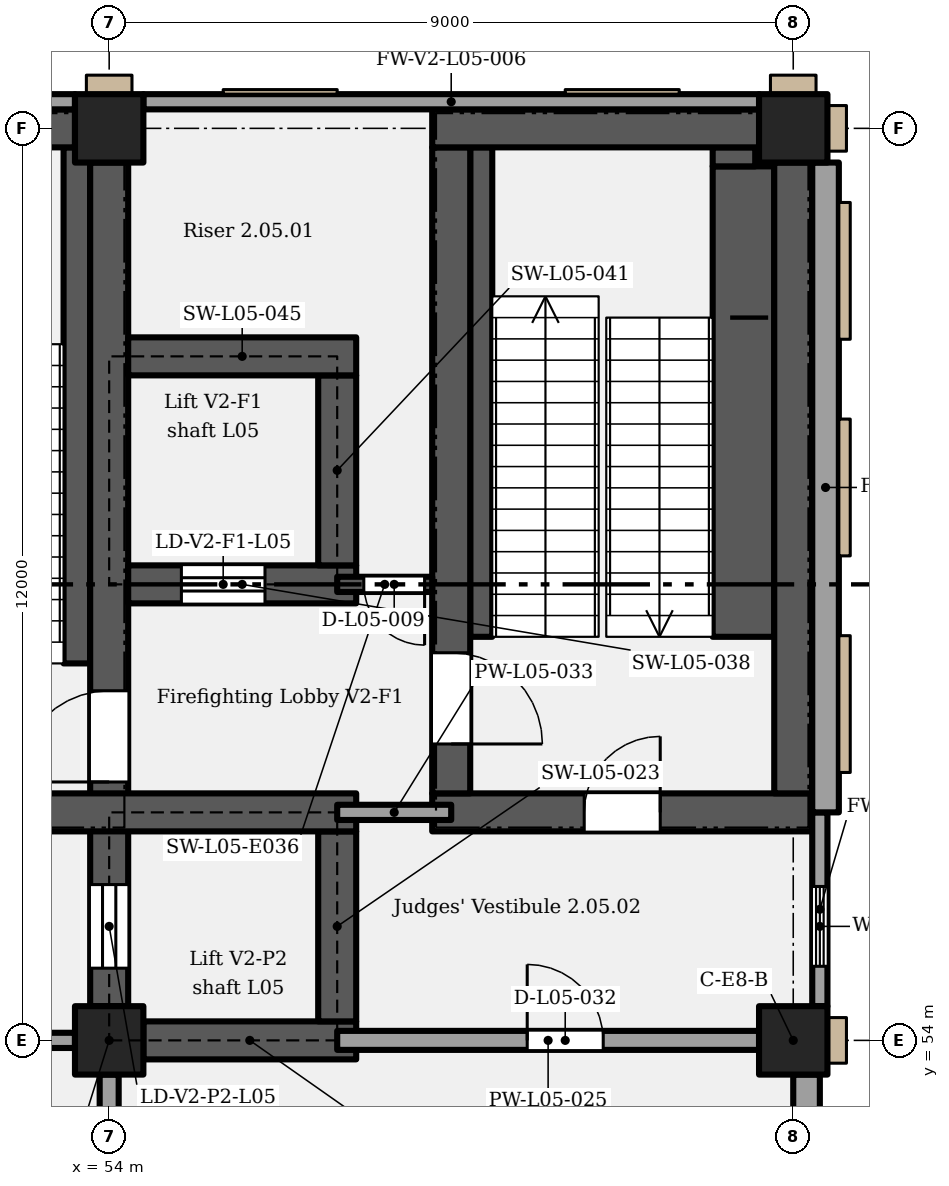
"""IFC4 building model, lengths in metres.
Left out: names, types, materials, properties, quantities, classifications, styles, units other than length and angle.
Written with IfcOpenShell. Run it as: python <this file> out.ifc"""

import sys

from ifc_helpers import new_model, si_unit, direction, frame, frame_2d, origin, origin_2d, place, context, subcontext, project, spatial, rectangle, extrude, element, fill, save


model = new_model("IFC4")
c1 = context("Model", 3, precision=1e-05, world=origin(), true_north=direction((0.0, 1.0)))
c2 = subcontext(c1, "Body", "Model", "MODEL_VIEW")
j1 = project(units=[si_unit("LENGTHUNIT", "METRE"), si_unit("PLANEANGLEUNIT", "RADIAN")], contexts=[c1])
p1 = place(None, origin())
s1 = spatial("IfcSite", under=j1, at=p1, CompositionType="ELEMENT")
p2 = place(p1, origin())
s2 = spatial("IfcBuilding", under=s1, at=p2, CompositionType="ELEMENT")
p3 = place(p2, frame((0.0, 0.0, 28.2)))
s3 = spatial("IfcBuildingStorey", under=s2, at=p3, CompositionType="ELEMENT", Elevation=28.2)
for number, where, z_axis, x_axis in (
    (1, (54.0, 54.0, 0.0), (0.0, 0.0, 1.0), (1.0, 0.0, 0.0)),
    (2, (63.0, 54.0, 0.0), (0.0, 0.0, 1.0), (1.0, 0.0, 0.0)),
    (3, (54.0, 66.0, 0.0), (0.0, 0.0, 1.0), (1.0, 0.0, 0.0)),
    (4, (63.0, 66.0, 0.0), (0.0, 0.0, 1.0), (1.0, 0.0, 0.0)),
):
    element("IfcColumn", number, at=place(p3, frame(where, z_axis=z_axis, x_axis=x_axis)), inside=s3, PredefinedType="COLUMN", context=c2, shape_type="SweptSolid", body=[
        extrude(rectangle(XDim=0.9, YDim=0.9, at=origin_2d()), origin(), (0.0, 0.0, 1.0), 5.4),
    ])
p4 = place(p3, frame((54.45, 54.0, 0.0), z_axis=(0.0, 0.0, 1.0), x_axis=(1.0, 0.0, 0.0)))
e5 = element("IfcWall", 5, at=p4, inside=s3, PredefinedType="SHEAR", context=c2, shape_type="SweptSolid", body=[
    extrude(rectangle(XDim=2.8, YDim=0.5, at=frame_2d((1.4, 0.0))), origin(), (0.0, 0.0, 1.0), 5.15),
])
p5 = place(p3, frame((57.0, 54.25, 0.0), z_axis=(0.0, 0.0, 1.0), x_axis=(0.0, 1.0, 0.0)))
e6 = element("IfcWall", 6, at=p5, inside=s3, PredefinedType="SHEAR", context=c2, shape_type="SweptSolid", body=[
    extrude(rectangle(XDim=2.5, YDim=0.5, at=frame_2d((1.25, 0.0))), origin(), (0.0, 0.0, 1.0), 5.15),
])
p6 = place(p3, frame((54.0, 54.45, 0.0), z_axis=(0.0, 0.0, 1.0), x_axis=(0.0, 1.0, 0.0)))
e7 = element("IfcWall", 7, at=p6, inside=s3, PredefinedType="SHEAR", context=c2, shape_type="SweptSolid", body=[
    extrude(rectangle(XDim=11.1, YDim=0.5, at=frame_2d((5.55, 0.0))), origin(), (0.0, 0.0, 1.0), 5.15),
])
p7 = place(p6, frame((0.5, 0.0, 0.0)))
e8 = element("IfcOpeningElement", 8, at=p7, cuts=e7, PredefinedType="OPENING", context=c2, shape_type="SweptSolid", body=[
    extrude(rectangle(XDim=1.1, YDim=2.1, at=frame_2d((0.55, 1.05))), frame((0.0, 0.26, 0.0), z_axis=(0.0, -1.0, 0.0), x_axis=(1.0, 0.0, 0.0)), (0.0, 0.0, 1.0), 0.52),
])
p8 = place(p6, frame((2.95, 0.0, 0.0)))
e9 = element("IfcOpeningElement", 9, at=p8, cuts=e7, PredefinedType="OPENING", context=c2, shape_type="SweptSolid", body=[
    extrude(rectangle(XDim=1.2, YDim=2.1, at=frame_2d((0.6, 1.05))), frame((0.0, 0.26, 0.0), z_axis=(0.0, -1.0, 0.0), x_axis=(1.0, 0.0, 0.0)), (0.0, 0.0, 1.0), 0.52),
])
p9 = place(p3, frame((46.25, 57.0, 0.0), z_axis=(0.0, 0.0, 1.0), x_axis=(1.0, 0.0, 0.0)))
e10 = element("IfcWall", 10, at=p9, inside=s3, PredefinedType="SHEAR", context=c2, shape_type="SweptSolid", body=[
    extrude(rectangle(XDim=11.0, YDim=0.5, at=frame_2d((5.5, 0.0))), origin(), (0.0, 0.0, 1.0), 5.15),
])
p10 = place(p9, frame((4.9, 0.0, 0.0)))
e11 = element("IfcOpeningElement", 11, at=p10, cuts=e10, PredefinedType="OPENING", context=c2, shape_type="SweptSolid", body=[
    extrude(rectangle(XDim=1.2, YDim=2.1, at=frame_2d((0.6, 1.05))), frame((0.0, 0.26, 0.0), z_axis=(0.0, -1.0, 0.0), x_axis=(1.0, 0.0, 0.0)), (0.0, 0.0, 1.0), 0.52),
])
p11 = place(p3, frame((58.25, 57.0, 0.0), z_axis=(0.0, 0.0, 1.0), x_axis=(1.0, 0.0, 0.0)))
e12 = element("IfcWall", 12, at=p11, inside=s3, PredefinedType="SHEAR", context=c2, shape_type="SweptSolid", body=[
    extrude(rectangle(XDim=5.0, YDim=0.5, at=frame_2d((2.5, 0.0))), origin(), (0.0, 0.0, 1.0), 5.15),
])
p12 = place(p11, frame((2.0, 0.0, 0.0)))
e13 = element("IfcOpeningElement", 13, at=p12, cuts=e12, PredefinedType="OPENING", context=c2, shape_type="SweptSolid", body=[
    extrude(rectangle(XDim=1.0, YDim=2.1, at=frame_2d((0.5, 1.05))), frame((0.0, 0.26, 0.0), z_axis=(0.0, -1.0, 0.0), x_axis=(1.0, 0.0, 0.0)), (0.0, 0.0, 1.0), 0.52),
])
p13 = place(p3, frame((58.5, 57.25, 0.0), z_axis=(0.0, 0.0, 1.0), x_axis=(0.0, 1.0, 0.0)))
e14 = element("IfcWall", 14, at=p13, inside=s3, PredefinedType="SHEAR", context=c2, shape_type="SweptSolid", body=[
    extrude(rectangle(XDim=8.5, YDim=0.5, at=frame_2d((4.25, 0.0))), origin(), (0.0, 0.0, 1.0), 5.15),
])
p14 = place(p13, frame((1.85, 0.0, 0.0), z_axis=(0.0, 0.0, 1.0), x_axis=(-1.0, 0.0, 0.0)))
e15 = element("IfcOpeningElement", 15, at=p14, cuts=e14, PredefinedType="OPENING", context=c2, shape_type="SweptSolid", body=[
    extrude(rectangle(XDim=1.2, YDim=2.1, at=frame_2d((0.6, 1.05))), frame((0.0, 0.26, 0.0), z_axis=(0.0, -1.0, 0.0), x_axis=(1.0, 0.0, 0.0)), (0.0, 0.0, 1.0), 0.52),
])
p15 = place(p3, frame((63.0, 57.25, 0.0), z_axis=(0.0, 0.0, 1.0), x_axis=(0.0, 1.0, 0.0)))
e16 = element("IfcWall", 16, at=p15, inside=s3, PredefinedType="SHEAR", context=c2, shape_type="SweptSolid", body=[
    extrude(rectangle(XDim=8.3, YDim=0.5, at=frame_2d((4.15, 0.0))), origin(), (0.0, 0.0, 1.0), 5.15),
])
p16 = place(p3, frame((54.25, 60.0, 0.0), z_axis=(0.0, 0.0, 1.0), x_axis=(1.0, 0.0, 0.0)))
e17 = element("IfcWall", 17, at=p16, inside=s3, PredefinedType="SHEAR", context=c2, shape_type="SweptSolid", body=[
    extrude(rectangle(XDim=3.0, YDim=0.5, at=frame_2d((1.5, 0.0))), origin(), (0.0, 0.0, 1.0), 5.15),
])
p17 = place(p16, frame((0.7, 0.0, 0.0)))
e18 = element("IfcOpeningElement", 18, at=p17, cuts=e17, PredefinedType="OPENING", context=c2, shape_type="SweptSolid", body=[
    extrude(rectangle(XDim=1.1, YDim=2.1, at=frame_2d((0.55, 1.05))), frame((0.0, 0.26, 0.0), z_axis=(0.0, -1.0, 0.0), x_axis=(1.0, 0.0, 0.0)), (0.0, 0.0, 1.0), 0.52),
])
p18 = place(p3, frame((57.0, 60.25, 0.0), z_axis=(0.0, 0.0, 1.0), x_axis=(0.0, 1.0, 0.0)))
e19 = element("IfcWall", 19, at=p18, inside=s3, PredefinedType="SHEAR", context=c2, shape_type="SweptSolid", body=[
    extrude(rectangle(XDim=2.5, YDim=0.5, at=frame_2d((1.25, 0.0))), origin(), (0.0, 0.0, 1.0), 5.15),
])
p19 = place(p3, frame((54.25, 63.0, 0.0), z_axis=(0.0, 0.0, 1.0), x_axis=(1.0, 0.0, 0.0)))
e20 = element("IfcWall", 20, at=p19, inside=s3, PredefinedType="SHEAR", context=c2, shape_type="SweptSolid", body=[
    extrude(rectangle(XDim=3.0, YDim=0.5, at=frame_2d((1.5, 0.0))), origin(), (0.0, 0.0, 1.0), 5.15),
])
for number, where, z_axis, x_axis in (
    (21, (49.25, 66.0, 0.0), (0.0, 0.0, 1.0), (1.0, 0.0, 0.0)),
    (22, (58.25, 66.0, 0.0), (0.0, 0.0, 1.0), (1.0, 0.0, 0.0)),
):
    element("IfcWall", number, at=place(p3, frame(where, z_axis=z_axis, x_axis=x_axis)), inside=s3, PredefinedType="SHEAR", context=c2, shape_type="SweptSolid", body=[
        extrude(rectangle(XDim=4.3, YDim=0.5, at=frame_2d((2.15, 0.0))), origin(), (0.0, 0.0, 1.0), 5.15),
    ])
p20 = place(p3, frame((45.45, 66.35, 0.0), z_axis=(0.0, 0.0, 1.0), x_axis=(1.0, 0.0, 0.0)))
e23 = element("IfcWall", 23, at=p20, inside=s3, PredefinedType="SOLIDWALL", context=c2, shape_type="SweptSolid", body=[
    extrude(rectangle(XDim=8.1, YDim=0.2, at=frame_2d((4.05, 0.0))), origin(), (0.0, 0.0, 1.0), 5.15),
])
p21 = place(p20, frame((1.05, 0.0, 1.05)))
e24 = element("IfcOpeningElement", 24, at=p21, cuts=e23, PredefinedType="OPENING", context=c2, shape_type="SweptSolid", body=[
    extrude(rectangle(XDim=1.5, YDim=3.5, at=frame_2d((0.75, 1.75))), frame((0.0, 0.11, 0.0), z_axis=(0.0, -1.0, 0.0), x_axis=(1.0, 0.0, 0.0)), (0.0, 0.0, 1.0), 0.22),
])
p22 = place(p3, frame((54.45, 66.35, 0.0), z_axis=(0.0, 0.0, 1.0), x_axis=(1.0, 0.0, 0.0)))
e25 = element("IfcWall", 25, at=p22, inside=s3, PredefinedType="SOLIDWALL", context=c2, shape_type="SweptSolid", body=[
    extrude(rectangle(XDim=8.1, YDim=0.2, at=frame_2d((4.05, 0.0))), origin(), (0.0, 0.0, 1.0), 5.15),
])
p23 = place(p3, frame((63.175, 46.5, 0.0), z_axis=(0.0, 0.0, 1.0), x_axis=(0.0, 1.0, 0.0)))
e26 = element("IfcWall", 26, at=p23, inside=s3, PredefinedType="SOLIDWALL", context=c2, shape_type="SweptSolid", body=[
    extrude(rectangle(XDim=7.05, YDim=0.35, at=frame_2d((3.525, 0.0))), origin(), (0.0, 0.0, 1.0), 5.15),
])
p24 = place(p23, frame((1.8, 0.0, 1.05)))
e27 = element("IfcOpeningElement", 27, at=p24, cuts=e26, PredefinedType="OPENING", context=c2, shape_type="SweptSolid", body=[
    extrude(rectangle(XDim=1.5, YDim=3.5, at=frame_2d((0.75, 1.75))), frame((0.0, 0.185, 0.0), z_axis=(0.0, -1.0, 0.0), x_axis=(1.0, 0.0, 0.0)), (0.0, 0.0, 1.0), 0.37),
])
p25 = place(p23, frame((5.1, 0.0, 1.05)))
e28 = element("IfcOpeningElement", 28, at=p25, cuts=e26, PredefinedType="OPENING", context=c2, shape_type="SweptSolid", body=[
    extrude(rectangle(XDim=1.5, YDim=3.5, at=frame_2d((0.75, 1.75))), frame((0.0, 0.185, 0.0), z_axis=(0.0, -1.0, 0.0), x_axis=(1.0, 0.0, 0.0)), (0.0, 0.0, 1.0), 0.37),
])
p26 = place(p3, frame((63.35, 54.45, 0.0), z_axis=(0.0, 0.0, 1.0), x_axis=(0.0, 1.0, 0.0)))
e29 = element("IfcWall", 29, at=p26, inside=s3, PredefinedType="SOLIDWALL", context=c2, shape_type="SweptSolid", body=[
    extrude(rectangle(XDim=2.55, YDim=0.2, at=frame_2d((1.275, 0.0))), origin(), (0.0, 0.0, 1.0), 5.15),
])
p27 = place(p26, frame((0.525, 0.0, 1.05)))
e30 = element("IfcOpeningElement", 30, at=p27, cuts=e29, PredefinedType="OPENING", context=c2, shape_type="SweptSolid", body=[
    extrude(rectangle(XDim=1.05, YDim=2.4, at=frame_2d((0.525, 1.2))), frame((0.0, 0.11, 0.0), z_axis=(0.0, -1.0, 0.0), x_axis=(1.0, 0.0, 0.0)), (0.0, 0.0, 1.0), 0.22),
])
p28 = place(p3, frame((63.425, 57.0, 0.0), z_axis=(0.0, 0.0, 1.0), x_axis=(0.0, 1.0, 0.0)))
e31 = element("IfcWall", 31, at=p28, inside=s3, PredefinedType="SOLIDWALL", context=c2, shape_type="SweptSolid", body=[
    extrude(rectangle(XDim=8.55, YDim=0.35, at=frame_2d((4.275, 0.0))), origin(), (0.0, 0.0, 1.0), 5.15),
])
p29 = place(p3, frame((49.5, 54.0, 0.0), z_axis=(0.0, 0.0, 1.0), x_axis=(1.0, 0.0, 0.0)))
e32 = element("IfcWall", 32, at=p29, inside=s3, PredefinedType="PARTITIONING", context=c2, shape_type="SweptSolid", body=[
    extrude(rectangle(XDim=4.05, YDim=0.2, at=frame_2d((2.025, 0.0))), origin(), (0.0, 0.0, 1.0), 4.4),
])
p30 = place(p29, frame((1.35, 0.0, 0.0)))
e33 = element("IfcOpeningElement", 33, at=p30, cuts=e32, PredefinedType="OPENING", context=c2, shape_type="SweptSolid", body=[
    extrude(rectangle(XDim=1.8, YDim=2.1, at=frame_2d((0.9, 1.05))), frame((0.0, 0.11, 0.0), z_axis=(0.0, -1.0, 0.0), x_axis=(1.0, 0.0, 0.0)), (0.0, 0.0, 1.0), 0.22),
])
p31 = place(p3, frame((57.0, 54.0, 0.0), z_axis=(0.0, 0.0, 1.0), x_axis=(1.0, 0.0, 0.0)))
e34 = element("IfcWall", 34, at=p31, inside=s3, PredefinedType="PARTITIONING", context=c2, shape_type="SweptSolid", body=[
    extrude(rectangle(XDim=5.55, YDim=0.25, at=frame_2d((2.775, 0.0))), origin(), (0.0, 0.0, 1.0), 4.4),
])
p32 = place(p31, frame((2.5, 0.0, 0.0)))
e35 = element("IfcOpeningElement", 35, at=p32, cuts=e34, PredefinedType="OPENING", context=c2, shape_type="SweptSolid", body=[
    extrude(rectangle(XDim=1.0, YDim=2.1, at=frame_2d((0.5, 1.05))), frame((0.0, 0.135, 0.0), z_axis=(0.0, -1.0, 0.0), x_axis=(1.0, 0.0, 0.0)), (0.0, 0.0, 1.0), 0.27),
])
p33 = place(p3, frame((57.0, 57.0, 0.0), z_axis=(0.0, 0.0, 1.0), x_axis=(1.0, 0.0, 0.0)))
e36 = element("IfcWall", 36, at=p33, inside=s3, PredefinedType="PARTITIONING", context=c2, shape_type="SweptSolid", body=[
    extrude(rectangle(XDim=1.5, YDim=0.2, at=frame_2d((0.75, 0.0))), origin(), (0.0, 0.0, 1.0), 5.15),
])
p34 = place(p3, frame((57.0, 60.0, 0.0), z_axis=(0.0, 0.0, 1.0), x_axis=(1.0, 0.0, 0.0)))
e37 = element("IfcWall", 37, at=p34, inside=s3, PredefinedType="SHEAR", context=c2, shape_type="SweptSolid", body=[
    extrude(rectangle(XDim=1.25, YDim=0.2, at=frame_2d((0.625, 0.0))), origin(), (0.0, 0.0, 1.0), 5.15),
])
p35 = place(p34, frame((1.15, 0.0, 0.0), z_axis=(0.0, 0.0, 1.0), x_axis=(-1.0, 0.0, 0.0)))
e38 = element("IfcOpeningElement", 38, at=p35, cuts=e37, PredefinedType="OPENING", context=c2, shape_type="SweptSolid", body=[
    extrude(rectangle(XDim=0.8, YDim=2.0, at=frame_2d((0.4, 1.0))), frame((0.0, 0.11, 0.0), z_axis=(0.0, -1.0, 0.0), x_axis=(1.0, 0.0, 0.0)), (0.0, 0.0, 1.0), 0.22),
])
p36 = place(p3, frame((54.0, 46.5, 0.0), z_axis=(0.0, 0.0, 1.0), x_axis=(0.0, 1.0, 0.0)))
e39 = element("IfcWall", 39, at=p36, inside=s3, PredefinedType="PARTITIONING", context=c2, shape_type="SweptSolid", body=[
    extrude(rectangle(XDim=7.05, YDim=0.25, at=frame_2d((3.525, 0.0))), origin(), (0.0, 0.0, 1.0), 4.2),
])
p37 = place(p36, frame((2.9, 0.0, 0.0), z_axis=(0.0, 0.0, 1.0), x_axis=(-1.0, 0.0, 0.0)))
e40 = element("IfcOpeningElement", 40, at=p37, cuts=e39, PredefinedType="OPENING", context=c2, shape_type="SweptSolid", body=[
    extrude(rectangle(XDim=1.8, YDim=2.4, at=frame_2d((0.9, 1.2))), frame((0.0, 0.135, 0.0), z_axis=(0.0, -1.0, 0.0), x_axis=(1.0, 0.0, 0.0)), (0.0, 0.0, 1.0), 0.27),
])
p38 = place(p36, frame((5.9, 0.0, 0.0), z_axis=(0.0, 0.0, 1.0), x_axis=(-1.0, 0.0, 0.0)))
e41 = element("IfcOpeningElement", 41, at=p38, cuts=e39, PredefinedType="OPENING", context=c2, shape_type="SweptSolid", body=[
    extrude(rectangle(XDim=1.8, YDim=2.4, at=frame_2d((0.9, 1.2))), frame((0.0, 0.135, 0.0), z_axis=(0.0, -1.0, 0.0), x_axis=(1.0, 0.0, 0.0)), (0.0, 0.0, 1.0), 0.27),
])
p39 = place(p3, frame((53.575, 58.96, 0.0), z_axis=(0.0, 0.0, 1.0), x_axis=(0.0, 1.0, 0.0)))
e42 = element("IfcWall", 42, at=p39, inside=s3, PredefinedType="SHEAR", context=c2, shape_type="SweptSolid", body=[
    extrude(rectangle(XDim=6.79, YDim=0.35, at=frame_2d((3.395, 0.0))), origin(), (0.0, 0.0, 1.0), 5.15),
])
p40 = place(p3, frame((58.895, 59.31, 0.0), z_axis=(0.0, 0.0, 1.0), x_axis=(0.0, 1.0, 0.0)))
e43 = element("IfcWall", 43, at=p40, inside=s3, PredefinedType="SHEAR", context=c2, shape_type="SweptSolid", body=[
    extrude(rectangle(XDim=6.44, YDim=0.29, at=frame_2d((3.22, 0.0))), origin(), (0.0, 0.0, 1.0), 2.587),
])
p41 = place(p3, frame((62.345, 59.31, 0.0), z_axis=(0.0, 0.0, 1.0), x_axis=(0.0, 1.0, 0.0)))
e44 = element("IfcWall", 44, at=p41, inside=s3, PredefinedType="SHEAR", context=c2, shape_type="SweptSolid", body=[
    extrude(rectangle(XDim=6.19, YDim=0.81, at=frame_2d((3.095, 0.0))), origin(), (0.0, 0.0, 1.0), 2.587),
])
p42 = place(p3, frame((62.22, 65.5, 0.0), z_axis=(0.0, 0.0, 1.0), x_axis=(0.0, 1.0, 0.0)))
e45 = element("IfcWall", 45, at=p42, inside=s3, PredefinedType="SHEAR", context=c2, shape_type="SweptSolid", body=[
    extrude(rectangle(XDim=0.25, YDim=0.56, at=frame_2d((0.125, 0.0))), origin(), (0.0, 0.0, 1.0), 2.587),
])
p43 = place(p27, origin())
e46 = element("IfcWindow", 46, at=p43, inside=s3, PartitioningType="SINGLE_PANEL", PredefinedType="WINDOW", context=c2, shape_type="SweptSolid", body=[
    extrude(rectangle(XDim=1.05, YDim=2.4, at=frame_2d((0.525, 1.2))), frame((0.0, 0.03, 0.0), z_axis=(0.0, -1.0, 0.0), x_axis=(1.0, 0.0, 0.0)), (0.0, 0.0, 1.0), 0.06),
])
fill(e30, e46)
p44 = place(p7, origin())
e47 = element("IfcDoor", 47, at=p44, inside=s3, OperationType="SLIDING_TO_LEFT", PredefinedType="DOOR", context=c2, shape_type="SweptSolid", body=[
    extrude(rectangle(XDim=1.1, YDim=2.1, at=frame_2d((0.55, 1.05))), frame((0.0, 0.025, 0.0), z_axis=(0.0, -1.0, 0.0), x_axis=(1.0, 0.0, 0.0)), (0.0, 0.0, 1.0), 0.05),
])
fill(e8, e47)
p45 = place(p17, origin())
e48 = element("IfcDoor", 48, at=p45, inside=s3, OperationType="SLIDING_TO_LEFT", PredefinedType="DOOR", context=c2, shape_type="SweptSolid", body=[
    extrude(rectangle(XDim=1.1, YDim=2.1, at=frame_2d((0.55, 1.05))), frame((0.0, 0.025, 0.0), z_axis=(0.0, -1.0, 0.0), x_axis=(1.0, 0.0, 0.0)), (0.0, 0.0, 1.0), 0.05),
])
fill(e18, e48)
p46 = place(p8, origin())
e49 = element("IfcDoor", 49, at=p46, inside=s3, OperationType="SINGLE_SWING_LEFT", PredefinedType="DOOR", context=c2, shape_type="SweptSolid", body=[
    extrude(rectangle(XDim=1.2, YDim=2.1, at=frame_2d((0.6, 1.05))), frame((0.0, 0.025, 0.0), z_axis=(0.0, -1.0, 0.0), x_axis=(1.0, 0.0, 0.0)), (0.0, 0.0, 1.0), 0.05),
])
fill(e9, e49)
p47 = place(p14, origin())
e50 = element("IfcDoor", 50, at=p47, inside=s3, OperationType="SINGLE_SWING_RIGHT", PredefinedType="DOOR", context=c2, shape_type="SweptSolid", body=[
    extrude(rectangle(XDim=1.2, YDim=2.1, at=frame_2d((0.6, 1.05))), frame((0.0, 0.025, 0.0), z_axis=(0.0, -1.0, 0.0), x_axis=(1.0, 0.0, 0.0)), (0.0, 0.0, 1.0), 0.05),
])
fill(e15, e50)
p48 = place(p35, origin())
e51 = element("IfcDoor", 51, at=p48, inside=s3, OperationType="SINGLE_SWING_LEFT", PredefinedType="DOOR", context=c2, shape_type="SweptSolid", body=[
    extrude(rectangle(XDim=0.8, YDim=2.0, at=frame_2d((0.4, 1.0))), frame((0.0, 0.025, 0.0), z_axis=(0.0, -1.0, 0.0), x_axis=(1.0, 0.0, 0.0)), (0.0, 0.0, 1.0), 0.05),
])
fill(e38, e51)
p49 = place(p12, origin())
e52 = element("IfcDoor", 52, at=p49, inside=s3, OperationType="SINGLE_SWING_RIGHT", PredefinedType="DOOR", context=c2, shape_type="SweptSolid", body=[
    extrude(rectangle(XDim=1.0, YDim=2.1, at=frame_2d((0.5, 1.05))), frame((0.0, 0.025, 0.0), z_axis=(0.0, -1.0, 0.0), x_axis=(1.0, 0.0, 0.0)), (0.0, 0.0, 1.0), 0.05),
])
fill(e13, e52)
p50 = place(p32, origin())
e53 = element("IfcDoor", 53, at=p50, inside=s3, OperationType="SINGLE_SWING_LEFT", PredefinedType="DOOR", context=c2, shape_type="SweptSolid", body=[
    extrude(rectangle(XDim=1.0, YDim=2.1, at=frame_2d((0.5, 1.05))), frame((0.0, 0.025, 0.0), z_axis=(0.0, -1.0, 0.0), x_axis=(1.0, 0.0, 0.0)), (0.0, 0.0, 1.0), 0.05),
])
fill(e35, e53)
save(model, sys.argv[1])
